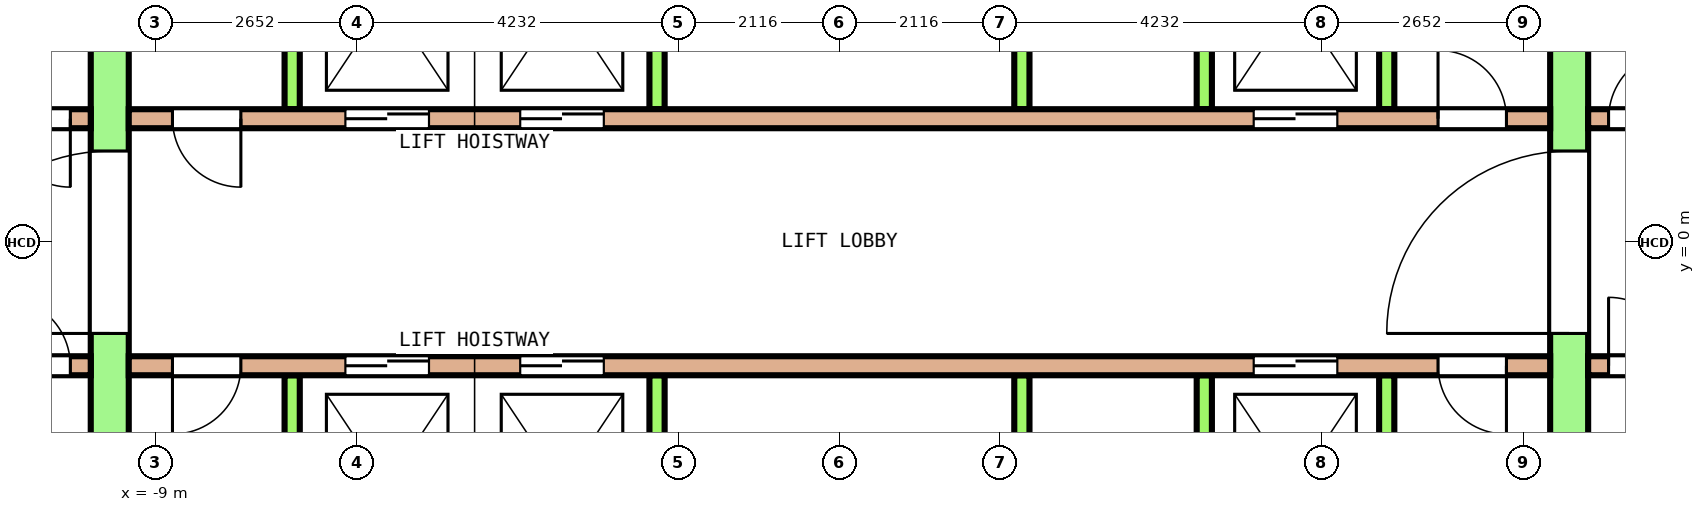
"""IFC4 building model, lengths in metres.
Left out: names, types, materials, properties, quantities, classifications, styles, units other than length and angle.
Written with IfcOpenShell. Run it as: python <this file> out.ifc"""

import sys

from ifc_helpers import new_model, si_unit, direction, frame, frame_2d, origin, place, context, subcontext, project, spatial, rectangle, extrude, element, fill, save


model = new_model("IFC4")
c1 = context("Model", 3, precision=1e-05, world=origin(), true_north=direction((0.0, 1.0)))
c2 = subcontext(c1, "Body", "Model", "MODEL_VIEW")
j1 = project(units=[si_unit("LENGTHUNIT", "METRE"), si_unit("PLANEANGLEUNIT", "RADIAN")], contexts=[c1])
p1 = place(None, origin())
s1 = spatial("IfcSite", under=j1, at=p1, CompositionType="ELEMENT")
p2 = place(p1, origin())
s2 = spatial("IfcBuilding", under=s1, at=p2, CompositionType="ELEMENT")
p3 = place(p2, frame((0.0, 0.0, 158.4)))
s3 = spatial("IfcBuildingStorey", under=s2, at=p3, CompositionType="ELEMENT", Elevation=158.4)
p4 = place(p3, frame((-9.6, -7.75, 0.0), z_axis=(0.0, 0.0, 1.0), x_axis=(0.0, 1.0, 0.0)))
e1 = element("IfcWall", 1, at=p4, inside=s3, PredefinedType="SHEAR", context=c2, shape_type="SweptSolid", body=[
    extrude(rectangle(XDim=15.5, YDim=0.5, at=frame_2d((7.75, 0.0))), origin(), (0.0, 0.0, 1.0), 4.1),
])
p5 = place(p4, frame((6.55, 0.0, 0.0)))
e2 = element("IfcOpeningElement", 2, at=p5, cuts=e1, PredefinedType="OPENING", context=c2, shape_type="SweptSolid", body=[
    extrude(rectangle(XDim=2.4, YDim=2.1, at=frame_2d((1.2, 1.05))), frame((0.0, 0.26, 0.0), z_axis=(0.0, -1.0, 0.0), x_axis=(1.0, 0.0, 0.0)), (0.0, 0.0, 1.0), 0.52),
])
p6 = place(p4, frame((13.45, 0.0, 0.0)))
e3 = element("IfcOpeningElement", 3, at=p6, cuts=e1, PredefinedType="OPENING", context=c2, shape_type="SweptSolid", body=[
    extrude(rectangle(XDim=1.2, YDim=2.1, at=frame_2d((0.6, 1.05))), frame((0.0, 0.26, 0.0), z_axis=(0.0, -1.0, 0.0), x_axis=(1.0, 0.0, 0.0)), (0.0, 0.0, 1.0), 0.52),
])
p7 = place(p4, frame((0.85, 0.0, 0.0)))
e4 = element("IfcOpeningElement", 4, at=p7, cuts=e1, PredefinedType="OPENING", context=c2, shape_type="SweptSolid", body=[
    extrude(rectangle(XDim=1.2, YDim=2.1, at=frame_2d((0.6, 1.05))), frame((0.0, 0.26, 0.0), z_axis=(0.0, -1.0, 0.0), x_axis=(1.0, 0.0, 0.0)), (0.0, 0.0, 1.0), 0.52),
])
p8 = place(p3, frame((9.6, -7.75, 0.0), z_axis=(0.0, 0.0, 1.0), x_axis=(0.0, 1.0, 0.0)))
e5 = element("IfcWall", 5, at=p8, inside=s3, PredefinedType="SHEAR", context=c2, shape_type="SweptSolid", body=[
    extrude(rectangle(XDim=15.5, YDim=0.5, at=frame_2d((7.75, 0.0))), origin(), (0.0, 0.0, 1.0), 4.1),
])
p9 = place(p8, frame((6.55, 0.0, 0.0)))
e6 = element("IfcOpeningElement", 6, at=p9, cuts=e5, PredefinedType="OPENING", context=c2, shape_type="SweptSolid", body=[
    extrude(rectangle(XDim=2.4, YDim=2.1, at=frame_2d((1.2, 1.05))), frame((0.0, 0.26, 0.0), z_axis=(0.0, -1.0, 0.0), x_axis=(1.0, 0.0, 0.0)), (0.0, 0.0, 1.0), 0.52),
])
p10 = place(p8, frame((13.45, 0.0, 0.0)))
e7 = element("IfcOpeningElement", 7, at=p10, cuts=e5, PredefinedType="OPENING", context=c2, shape_type="SweptSolid", body=[
    extrude(rectangle(XDim=1.2, YDim=2.1, at=frame_2d((0.6, 1.05))), frame((0.0, 0.26, 0.0), z_axis=(0.0, -1.0, 0.0), x_axis=(1.0, 0.0, 0.0)), (0.0, 0.0, 1.0), 0.52),
])
p11 = place(p8, frame((0.95, 0.0, 0.0)))
e8 = element("IfcOpeningElement", 8, at=p11, cuts=e5, PredefinedType="OPENING", context=c2, shape_type="SweptSolid", body=[
    extrude(rectangle(XDim=1.0, YDim=2.1, at=frame_2d((0.5, 1.05))), frame((0.0, 0.26, 0.0), z_axis=(0.0, -1.0, 0.0), x_axis=(1.0, 0.0, 0.0)), (0.0, 0.0, 1.0), 0.52),
])
p12 = place(p3, frame((-12.85, 1.625, 0.0), z_axis=(0.0, 0.0, 1.0), x_axis=(1.0, 0.0, 0.0)))
e9 = element("IfcWall", 9, at=p12, inside=s3, PredefinedType="SOLIDWALL", context=c2, shape_type="SweptSolid", body=[
    extrude(rectangle(XDim=3.0, YDim=0.25, at=frame_2d((1.5, 0.0))), origin(), (0.0, 0.0, 1.0), 4.1),
])
p13 = place(p12, frame((0.269, 0.0, 0.0)))
e10 = element("IfcOpeningElement", 10, at=p13, cuts=e9, PredefinedType="OPENING", context=c2, shape_type="SweptSolid", body=[
    extrude(rectangle(XDim=0.9, YDim=2.1, at=frame_2d((0.45, 1.05))), frame((0.0, 0.135, 0.0), z_axis=(0.0, -1.0, 0.0), x_axis=(1.0, 0.0, 0.0)), (0.0, 0.0, 1.0), 0.27),
])
p14 = place(p12, frame((1.831, 0.0, 0.0)))
e11 = element("IfcOpeningElement", 11, at=p14, cuts=e9, PredefinedType="OPENING", context=c2, shape_type="SweptSolid", body=[
    extrude(rectangle(XDim=0.9, YDim=2.1, at=frame_2d((0.45, 1.05))), frame((0.0, 0.135, 0.0), z_axis=(0.0, -1.0, 0.0), x_axis=(1.0, 0.0, 0.0)), (0.0, 0.0, 1.0), 0.27),
])
p15 = place(p3, frame((-9.35, 1.625, 0.0), z_axis=(0.0, 0.0, 1.0), x_axis=(1.0, 0.0, 0.0)))
e12 = element("IfcWall", 12, at=p15, inside=s3, PredefinedType="SOLIDWALL", context=c2, shape_type="SweptSolid", body=[
    extrude(rectangle(XDim=18.7, YDim=0.25, at=frame_2d((9.35, 0.0))), origin(), (0.0, 0.0, 1.0), 4.1),
])
p16 = place(p15, frame((2.85, 0.0, 0.0)))
e13 = element("IfcOpeningElement", 13, at=p16, cuts=e12, PredefinedType="OPENING", context=c2, shape_type="SweptSolid", body=[
    extrude(rectangle(XDim=1.1, YDim=2.1, at=frame_2d((0.55, 1.05))), frame((0.0, 0.135, 0.0), z_axis=(0.0, -1.0, 0.0), x_axis=(1.0, 0.0, 0.0)), (0.0, 0.0, 1.0), 0.27),
])
p17 = place(p15, frame((5.15, 0.0, 0.0)))
e14 = element("IfcOpeningElement", 14, at=p17, cuts=e12, PredefinedType="OPENING", context=c2, shape_type="SweptSolid", body=[
    extrude(rectangle(XDim=1.1, YDim=2.1, at=frame_2d((0.55, 1.05))), frame((0.0, 0.135, 0.0), z_axis=(0.0, -1.0, 0.0), x_axis=(1.0, 0.0, 0.0)), (0.0, 0.0, 1.0), 0.27),
])
p18 = place(p15, frame((14.8, 0.0, 0.0)))
e15 = element("IfcOpeningElement", 15, at=p18, cuts=e12, PredefinedType="OPENING", context=c2, shape_type="SweptSolid", body=[
    extrude(rectangle(XDim=1.1, YDim=2.1, at=frame_2d((0.55, 1.05))), frame((0.0, 0.135, 0.0), z_axis=(0.0, -1.0, 0.0), x_axis=(1.0, 0.0, 0.0)), (0.0, 0.0, 1.0), 0.27),
])
p19 = place(p15, frame((0.575, 0.0, 0.0)))
e16 = element("IfcOpeningElement", 16, at=p19, cuts=e12, PredefinedType="OPENING", context=c2, shape_type="SweptSolid", body=[
    extrude(rectangle(XDim=0.9, YDim=2.1, at=frame_2d((0.45, 1.05))), frame((0.0, 0.135, 0.0), z_axis=(0.0, -1.0, 0.0), x_axis=(1.0, 0.0, 0.0)), (0.0, 0.0, 1.0), 0.27),
])
p20 = place(p15, frame((17.225, 0.0, 0.0)))
e17 = element("IfcOpeningElement", 17, at=p20, cuts=e12, PredefinedType="OPENING", context=c2, shape_type="SweptSolid", body=[
    extrude(rectangle(XDim=0.9, YDim=2.1, at=frame_2d((0.45, 1.05))), frame((0.0, 0.135, 0.0), z_axis=(0.0, -1.0, 0.0), x_axis=(1.0, 0.0, 0.0)), (0.0, 0.0, 1.0), 0.27),
])
p21 = place(p3, frame((9.85, 1.625, 0.0), z_axis=(0.0, 0.0, 1.0), x_axis=(1.0, 0.0, 0.0)))
e18 = element("IfcWall", 18, at=p21, inside=s3, PredefinedType="SOLIDWALL", context=c2, shape_type="SweptSolid", body=[
    extrude(rectangle(XDim=3.0, YDim=0.25, at=frame_2d((1.5, 0.0))), origin(), (0.0, 0.0, 1.0), 4.1),
])
p22 = place(p21, frame((0.269, 0.0, 0.0)))
e19 = element("IfcOpeningElement", 19, at=p22, cuts=e18, PredefinedType="OPENING", context=c2, shape_type="SweptSolid", body=[
    extrude(rectangle(XDim=0.9, YDim=2.1, at=frame_2d((0.45, 1.05))), frame((0.0, 0.135, 0.0), z_axis=(0.0, -1.0, 0.0), x_axis=(1.0, 0.0, 0.0)), (0.0, 0.0, 1.0), 0.27),
])
p23 = place(p21, frame((1.831, 0.0, 0.0)))
e20 = element("IfcOpeningElement", 20, at=p23, cuts=e18, PredefinedType="OPENING", context=c2, shape_type="SweptSolid", body=[
    extrude(rectangle(XDim=0.9, YDim=2.1, at=frame_2d((0.45, 1.05))), frame((0.0, 0.135, 0.0), z_axis=(0.0, -1.0, 0.0), x_axis=(1.0, 0.0, 0.0)), (0.0, 0.0, 1.0), 0.27),
])
for number, where, z_axis, x_axis in (
    (21, (-7.2, 1.75, 0.0), (0.0, 0.0, 1.0), (0.0, 1.0, 0.0)),
    (22, (-2.4, 1.75, 0.0), (0.0, 0.0, 1.0), (0.0, 1.0, 0.0)),
    (23, (2.4, 1.75, 0.0), (0.0, 0.0, 1.0), (0.0, 1.0, 0.0)),
    (24, (4.8, 1.75, 0.0), (0.0, 0.0, 1.0), (0.0, 1.0, 0.0)),
    (25, (7.2, 1.75, 0.0), (0.0, 0.0, 1.0), (0.0, 1.0, 0.0)),
):
    element("IfcWall", number, at=place(p3, frame(where, z_axis=z_axis, x_axis=x_axis)), inside=s3, PredefinedType="SOLIDWALL", context=c2, shape_type="SweptSolid", body=[
        extrude(rectangle(XDim=2.9, YDim=0.2, at=frame_2d((1.45, 0.0))), origin(), (0.0, 0.0, 1.0), 4.1),
    ])
p24 = place(p3, frame((-12.85, -1.625, 0.0), z_axis=(0.0, 0.0, 1.0), x_axis=(1.0, 0.0, 0.0)))
e26 = element("IfcWall", 26, at=p24, inside=s3, PredefinedType="SOLIDWALL", context=c2, shape_type="SweptSolid", body=[
    extrude(rectangle(XDim=3.0, YDim=0.25, at=frame_2d((1.5, 0.0))), origin(), (0.0, 0.0, 1.0), 4.1),
])
p25 = place(p24, frame((0.269, 0.0, 0.0)))
e27 = element("IfcOpeningElement", 27, at=p25, cuts=e26, PredefinedType="OPENING", context=c2, shape_type="SweptSolid", body=[
    extrude(rectangle(XDim=0.9, YDim=2.1, at=frame_2d((0.45, 1.05))), frame((0.0, 0.135, 0.0), z_axis=(0.0, -1.0, 0.0), x_axis=(1.0, 0.0, 0.0)), (0.0, 0.0, 1.0), 0.27),
])
p26 = place(p24, frame((1.831, 0.0, 0.0)))
e28 = element("IfcOpeningElement", 28, at=p26, cuts=e26, PredefinedType="OPENING", context=c2, shape_type="SweptSolid", body=[
    extrude(rectangle(XDim=0.9, YDim=2.1, at=frame_2d((0.45, 1.05))), frame((0.0, 0.135, 0.0), z_axis=(0.0, -1.0, 0.0), x_axis=(1.0, 0.0, 0.0)), (0.0, 0.0, 1.0), 0.27),
])
p27 = place(p3, frame((-9.35, -1.625, 0.0), z_axis=(0.0, 0.0, 1.0), x_axis=(1.0, 0.0, 0.0)))
e29 = element("IfcWall", 29, at=p27, inside=s3, PredefinedType="SOLIDWALL", context=c2, shape_type="SweptSolid", body=[
    extrude(rectangle(XDim=18.7, YDim=0.25, at=frame_2d((9.35, 0.0))), origin(), (0.0, 0.0, 1.0), 4.1),
])
p28 = place(p27, frame((2.85, 0.0, 0.0)))
e30 = element("IfcOpeningElement", 30, at=p28, cuts=e29, PredefinedType="OPENING", context=c2, shape_type="SweptSolid", body=[
    extrude(rectangle(XDim=1.1, YDim=2.1, at=frame_2d((0.55, 1.05))), frame((0.0, 0.135, 0.0), z_axis=(0.0, -1.0, 0.0), x_axis=(1.0, 0.0, 0.0)), (0.0, 0.0, 1.0), 0.27),
])
p29 = place(p27, frame((5.15, 0.0, 0.0)))
e31 = element("IfcOpeningElement", 31, at=p29, cuts=e29, PredefinedType="OPENING", context=c2, shape_type="SweptSolid", body=[
    extrude(rectangle(XDim=1.1, YDim=2.1, at=frame_2d((0.55, 1.05))), frame((0.0, 0.135, 0.0), z_axis=(0.0, -1.0, 0.0), x_axis=(1.0, 0.0, 0.0)), (0.0, 0.0, 1.0), 0.27),
])
p30 = place(p27, frame((14.8, 0.0, 0.0)))
e32 = element("IfcOpeningElement", 32, at=p30, cuts=e29, PredefinedType="OPENING", context=c2, shape_type="SweptSolid", body=[
    extrude(rectangle(XDim=1.1, YDim=2.1, at=frame_2d((0.55, 1.05))), frame((0.0, 0.135, 0.0), z_axis=(0.0, -1.0, 0.0), x_axis=(1.0, 0.0, 0.0)), (0.0, 0.0, 1.0), 0.27),
])
p31 = place(p27, frame((0.575, 0.0, 0.0)))
e33 = element("IfcOpeningElement", 33, at=p31, cuts=e29, PredefinedType="OPENING", context=c2, shape_type="SweptSolid", body=[
    extrude(rectangle(XDim=0.9, YDim=2.1, at=frame_2d((0.45, 1.05))), frame((0.0, 0.135, 0.0), z_axis=(0.0, -1.0, 0.0), x_axis=(1.0, 0.0, 0.0)), (0.0, 0.0, 1.0), 0.27),
])
p32 = place(p27, frame((17.225, 0.0, 0.0)))
e34 = element("IfcOpeningElement", 34, at=p32, cuts=e29, PredefinedType="OPENING", context=c2, shape_type="SweptSolid", body=[
    extrude(rectangle(XDim=0.9, YDim=2.1, at=frame_2d((0.45, 1.05))), frame((0.0, 0.135, 0.0), z_axis=(0.0, -1.0, 0.0), x_axis=(1.0, 0.0, 0.0)), (0.0, 0.0, 1.0), 0.27),
])
p33 = place(p3, frame((9.85, -1.625, 0.0), z_axis=(0.0, 0.0, 1.0), x_axis=(1.0, 0.0, 0.0)))
e35 = element("IfcWall", 35, at=p33, inside=s3, PredefinedType="SOLIDWALL", context=c2, shape_type="SweptSolid", body=[
    extrude(rectangle(XDim=3.0, YDim=0.25, at=frame_2d((1.5, 0.0))), origin(), (0.0, 0.0, 1.0), 4.1),
])
p34 = place(p33, frame((0.269, 0.0, 0.0)))
e36 = element("IfcOpeningElement", 36, at=p34, cuts=e35, PredefinedType="OPENING", context=c2, shape_type="SweptSolid", body=[
    extrude(rectangle(XDim=0.9, YDim=2.1, at=frame_2d((0.45, 1.05))), frame((0.0, 0.135, 0.0), z_axis=(0.0, -1.0, 0.0), x_axis=(1.0, 0.0, 0.0)), (0.0, 0.0, 1.0), 0.27),
])
p35 = place(p33, frame((1.831, 0.0, 0.0)))
e37 = element("IfcOpeningElement", 37, at=p35, cuts=e35, PredefinedType="OPENING", context=c2, shape_type="SweptSolid", body=[
    extrude(rectangle(XDim=0.9, YDim=2.1, at=frame_2d((0.45, 1.05))), frame((0.0, 0.135, 0.0), z_axis=(0.0, -1.0, 0.0), x_axis=(1.0, 0.0, 0.0)), (0.0, 0.0, 1.0), 0.27),
])
for number, where, z_axis, x_axis in (
    (38, (-7.2, -4.65, 0.0), (0.0, 0.0, 1.0), (0.0, 1.0, 0.0)),
    (39, (-2.4, -4.65, 0.0), (0.0, 0.0, 1.0), (0.0, 1.0, 0.0)),
    (40, (2.4, -4.65, 0.0), (0.0, 0.0, 1.0), (0.0, 1.0, 0.0)),
    (41, (4.8, -4.65, 0.0), (0.0, 0.0, 1.0), (0.0, 1.0, 0.0)),
    (42, (7.2, -4.65, 0.0), (0.0, 0.0, 1.0), (0.0, 1.0, 0.0)),
):
    element("IfcWall", number, at=place(p3, frame(where, z_axis=z_axis, x_axis=x_axis)), inside=s3, PredefinedType="SOLIDWALL", context=c2, shape_type="SweptSolid", body=[
        extrude(rectangle(XDim=2.9, YDim=0.2, at=frame_2d((1.45, 0.0))), origin(), (0.0, 0.0, 1.0), 4.1),
    ])
p36 = place(p16, origin())
e43 = element("IfcDoor", 43, at=p36, inside=s3, OperationType="DOUBLE_DOOR_SLIDING", PredefinedType="DOOR", context=c2, shape_type="SweptSolid", body=[
    extrude(rectangle(XDim=1.1, YDim=2.1, at=frame_2d((0.55, 1.05))), frame((0.0, 0.075, 0.0), z_axis=(0.0, -1.0, 0.0), x_axis=(1.0, 0.0, 0.0)), (0.0, 0.0, 1.0), 0.15),
])
fill(e13, e43)
p37 = place(p17, origin())
e44 = element("IfcDoor", 44, at=p37, inside=s3, OperationType="DOUBLE_DOOR_SLIDING", PredefinedType="DOOR", context=c2, shape_type="SweptSolid", body=[
    extrude(rectangle(XDim=1.1, YDim=2.1, at=frame_2d((0.55, 1.05))), frame((0.0, 0.075, 0.0), z_axis=(0.0, -1.0, 0.0), x_axis=(1.0, 0.0, 0.0)), (0.0, 0.0, 1.0), 0.15),
])
fill(e14, e44)
p38 = place(p18, origin())
e45 = element("IfcDoor", 45, at=p38, inside=s3, OperationType="DOUBLE_DOOR_SLIDING", PredefinedType="DOOR", context=c2, shape_type="SweptSolid", body=[
    extrude(rectangle(XDim=1.1, YDim=2.1, at=frame_2d((0.55, 1.05))), frame((0.0, 0.075, 0.0), z_axis=(0.0, -1.0, 0.0), x_axis=(1.0, 0.0, 0.0)), (0.0, 0.0, 1.0), 0.15),
])
fill(e15, e45)
p39 = place(p28, origin())
e46 = element("IfcDoor", 46, at=p39, inside=s3, OperationType="DOUBLE_DOOR_SLIDING", PredefinedType="DOOR", context=c2, shape_type="SweptSolid", body=[
    extrude(rectangle(XDim=1.1, YDim=2.1, at=frame_2d((0.55, 1.05))), frame((0.0, 0.075, 0.0), z_axis=(0.0, -1.0, 0.0), x_axis=(1.0, 0.0, 0.0)), (0.0, 0.0, 1.0), 0.15),
])
fill(e30, e46)
p40 = place(p29, origin())
e47 = element("IfcDoor", 47, at=p40, inside=s3, OperationType="DOUBLE_DOOR_SLIDING", PredefinedType="DOOR", context=c2, shape_type="SweptSolid", body=[
    extrude(rectangle(XDim=1.1, YDim=2.1, at=frame_2d((0.55, 1.05))), frame((0.0, 0.075, 0.0), z_axis=(0.0, -1.0, 0.0), x_axis=(1.0, 0.0, 0.0)), (0.0, 0.0, 1.0), 0.15),
])
fill(e31, e47)
p41 = place(p30, origin())
e48 = element("IfcDoor", 48, at=p41, inside=s3, OperationType="DOUBLE_DOOR_SLIDING", PredefinedType="DOOR", context=c2, shape_type="SweptSolid", body=[
    extrude(rectangle(XDim=1.1, YDim=2.1, at=frame_2d((0.55, 1.05))), frame((0.0, 0.075, 0.0), z_axis=(0.0, -1.0, 0.0), x_axis=(1.0, 0.0, 0.0)), (0.0, 0.0, 1.0), 0.15),
])
fill(e32, e48)
p42 = place(p5, origin())
e49 = element("IfcDoor", 49, at=p42, inside=s3, OperationType="DOUBLE_DOOR_SINGLE_SWING", PredefinedType="DOOR", context=c2, shape_type="SweptSolid", body=[
    extrude(rectangle(XDim=2.4, YDim=2.1, at=frame_2d((1.2, 1.05))), frame((0.0, 0.2, 0.0), z_axis=(0.0, -1.0, 0.0), x_axis=(1.0, 0.0, 0.0)), (0.0, 0.0, 1.0), 0.4),
])
fill(e2, e49)
p43 = place(p9, origin())
e50 = element("IfcDoor", 50, at=p43, inside=s3, OperationType="DOUBLE_DOOR_SINGLE_SWING", PredefinedType="DOOR", context=c2, shape_type="SweptSolid", body=[
    extrude(rectangle(XDim=2.4, YDim=2.1, at=frame_2d((1.2, 1.05))), frame((0.0, 0.2, 0.0), z_axis=(0.0, -1.0, 0.0), x_axis=(1.0, 0.0, 0.0)), (0.0, 0.0, 1.0), 0.4),
])
fill(e6, e50)
p44 = place(p14, origin())
e51 = element("IfcDoor", 51, at=p44, inside=s3, OperationType="SINGLE_SWING_RIGHT", PredefinedType="DOOR", context=c2, shape_type="SweptSolid", body=[
    extrude(rectangle(XDim=0.9, YDim=2.1, at=frame_2d((0.45, 1.05))), frame((0.0, 0.075, 0.0), z_axis=(0.0, -1.0, 0.0), x_axis=(1.0, 0.0, 0.0)), (0.0, 0.0, 1.0), 0.15),
])
fill(e11, e51)
p45 = place(p19, origin())
e52 = element("IfcDoor", 52, at=p45, inside=s3, OperationType="SINGLE_SWING_LEFT", PredefinedType="DOOR", context=c2, shape_type="SweptSolid", body=[
    extrude(rectangle(XDim=0.9, YDim=2.1, at=frame_2d((0.45, 1.05))), frame((0.0, 0.075, 0.0), z_axis=(0.0, -1.0, 0.0), x_axis=(1.0, 0.0, 0.0)), (0.0, 0.0, 1.0), 0.15),
])
fill(e16, e52)
p46 = place(p20, origin())
e53 = element("IfcDoor", 53, at=p46, inside=s3, OperationType="SINGLE_SWING_RIGHT", PredefinedType="DOOR", context=c2, shape_type="SweptSolid", body=[
    extrude(rectangle(XDim=0.9, YDim=2.1, at=frame_2d((0.45, 1.05))), frame((0.0, 0.075, 0.0), z_axis=(0.0, -1.0, 0.0), x_axis=(1.0, 0.0, 0.0)), (0.0, 0.0, 1.0), 0.15),
])
fill(e17, e53)
p47 = place(p22, origin())
e54 = element("IfcDoor", 54, at=p47, inside=s3, OperationType="SINGLE_SWING_LEFT", PredefinedType="DOOR", context=c2, shape_type="SweptSolid", body=[
    extrude(rectangle(XDim=0.9, YDim=2.1, at=frame_2d((0.45, 1.05))), frame((0.0, 0.075, 0.0), z_axis=(0.0, -1.0, 0.0), x_axis=(1.0, 0.0, 0.0)), (0.0, 0.0, 1.0), 0.15),
])
fill(e19, e54)
p48 = place(p26, origin())
e55 = element("IfcDoor", 55, at=p48, inside=s3, OperationType="SINGLE_SWING_RIGHT", PredefinedType="DOOR", context=c2, shape_type="SweptSolid", body=[
    extrude(rectangle(XDim=0.9, YDim=2.1, at=frame_2d((0.45, 1.05))), frame((0.0, 0.075, 0.0), z_axis=(0.0, -1.0, 0.0), x_axis=(1.0, 0.0, 0.0)), (0.0, 0.0, 1.0), 0.15),
])
fill(e28, e55)
p49 = place(p31, origin())
e56 = element("IfcDoor", 56, at=p49, inside=s3, OperationType="SINGLE_SWING_LEFT", PredefinedType="DOOR", context=c2, shape_type="SweptSolid", body=[
    extrude(rectangle(XDim=0.9, YDim=2.1, at=frame_2d((0.45, 1.05))), frame((0.0, 0.075, 0.0), z_axis=(0.0, -1.0, 0.0), x_axis=(1.0, 0.0, 0.0)), (0.0, 0.0, 1.0), 0.15),
])
fill(e33, e56)
p50 = place(p32, origin())
e57 = element("IfcDoor", 57, at=p50, inside=s3, OperationType="SINGLE_SWING_RIGHT", PredefinedType="DOOR", context=c2, shape_type="SweptSolid", body=[
    extrude(rectangle(XDim=0.9, YDim=2.1, at=frame_2d((0.45, 1.05))), frame((0.0, 0.075, 0.0), z_axis=(0.0, -1.0, 0.0), x_axis=(1.0, 0.0, 0.0)), (0.0, 0.0, 1.0), 0.15),
])
fill(e34, e57)
p51 = place(p34, origin())
e58 = element("IfcDoor", 58, at=p51, inside=s3, OperationType="SINGLE_SWING_LEFT", PredefinedType="DOOR", context=c2, shape_type="SweptSolid", body=[
    extrude(rectangle(XDim=0.9, YDim=2.1, at=frame_2d((0.45, 1.05))), frame((0.0, 0.075, 0.0), z_axis=(0.0, -1.0, 0.0), x_axis=(1.0, 0.0, 0.0)), (0.0, 0.0, 1.0), 0.15),
])
fill(e36, e58)
save(model, sys.argv[1])
